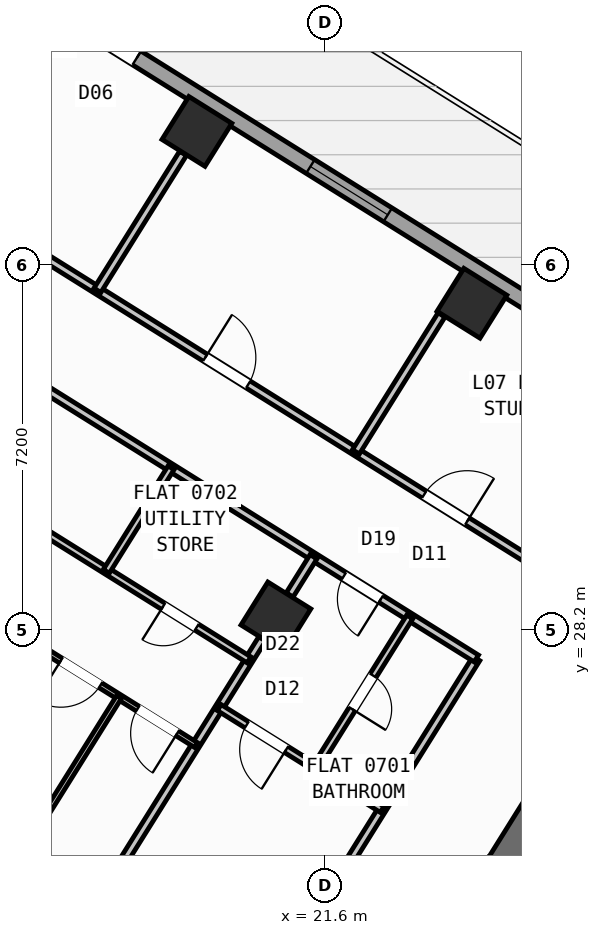
"""IFC4 building model, lengths in metres.
Left out: names, types, materials, properties, quantities, classifications, styles, units other than length and angle.
Written with IfcOpenShell. Run it as: python <this file> out.ifc"""

import sys

from ifc_helpers import new_model, si_unit, direction, frame, frame_2d, origin, origin_2d, place, context, subcontext, project, spatial, rectangle, hollow_rectangle, extrude, source, transform, mapped, element, fill, save


model = new_model("IFC4")
c1 = context("Model", 3, precision=1e-05, world=origin(), true_north=direction((0.0, 1.0)))
c2 = subcontext(c1, "Body", "Model", "MODEL_VIEW")
j1 = project(units=[si_unit("LENGTHUNIT", "METRE"), si_unit("PLANEANGLEUNIT", "RADIAN")], contexts=[c1])
p1 = place(None, origin())
s1 = spatial("IfcSite", under=j1, at=p1, CompositionType="ELEMENT")
p2 = place(p1, origin())
s2 = spatial("IfcBuilding", under=s1, at=p2, CompositionType="ELEMENT")
p3 = place(p2, frame((0.0, 0.0, 31.2)))
s3 = spatial("IfcBuildingStorey", under=s2, at=p3, CompositionType="ELEMENT", Elevation=31.2)
p4 = place(p3, frame((26.007, 24.976, 0.0), z_axis=(0.0, 0.0, 1.0), x_axis=(-0.529916319127, -0.848049936456, 0.0)))
e1 = element("IfcWall", 1, at=p4, inside=s3, PredefinedType="SHEAR", context=c2, shape_type="SweptSolid", body=[
    extrude(rectangle(XDim=6.375, YDim=0.65, at=frame_2d((3.188, 0.0))), origin(), (0.0, 0.0, 1.0), 3.35),
])
m1 = source(origin(), c2, "Body", "SweptSolid", [
    extrude(hollow_rectangle(XDim=1.0, YDim=1.0, WallThickness=0.04, at=origin_2d()), origin(), (0.0, 0.0, 1.0), 3.6),
])
for number, where, z_axis, x_axis in (
    (2, (24.5, 34.643, 0.0), (0.0, 0.0, 1.0), (-0.848, 0.53, 0.0)),
    (3, (20.632, 28.452, 0.0), (0.0, 0.0, 1.0), (-0.848, 0.53, 0.0)),
    (4, (19.073, 38.034, 0.0), (0.0, 0.0, 1.0), (-0.848, 0.53, 0.0)),
):
    element("IfcColumn", number, at=place(p3, frame(where, z_axis=z_axis, x_axis=x_axis)), inside=s3, PredefinedType="COLUMN", context=c2, shape_type="MappedRepresentation", body=[
        mapped(m1, transform((0.0, 0.0, 0.0), scale=1.0)),
    ])
p5 = place(p3, frame((14.138, 41.825, 0.0), z_axis=(0.0, 0.0, 1.0), x_axis=(0.848046498049, -0.529921821731, 0.0)))
e5 = element("IfcWall", 5, at=p5, inside=s3, PredefinedType="STANDARD", context=c2, shape_type="SweptSolid", body=[
    extrude(rectangle(XDim=31.588, YDim=0.32, at=frame_2d((15.794, 0.0))), origin(), (0.0, 0.0, 1.0), 3.35),
])
p6 = place(p5, frame((3.369, 0.0, 0.0)))
e6 = element("IfcOpeningElement", 6, at=p6, cuts=e5, PredefinedType="OPENING", context=c2, shape_type="SweptSolid", body=[
    extrude(rectangle(XDim=1.05, YDim=2.15, at=frame_2d((0.525, 1.075))), frame((0.0, 0.17, 0.0), z_axis=(0.0, -1.0, 0.0), x_axis=(1.0, 0.0, 0.0)), (0.0, 0.0, 1.0), 0.34),
])
p7 = place(p5, frame((0.946, 0.0, 0.85)))
e7 = element("IfcOpeningElement", 7, at=p7, cuts=e5, PredefinedType="OPENING", context=c2, shape_type="SweptSolid", body=[
    extrude(rectangle(XDim=1.8, YDim=1.5, at=frame_2d((0.9, 0.75))), frame((0.0, 0.17, 0.0), z_axis=(0.0, -1.0, 0.0), x_axis=(1.0, 0.0, 0.0)), (0.0, 0.0, 1.0), 0.34),
])
p8 = place(p5, frame((8.46, 0.0, 0.85)))
e8 = element("IfcOpeningElement", 8, at=p8, cuts=e5, PredefinedType="OPENING", context=c2, shape_type="SweptSolid", body=[
    extrude(rectangle(XDim=1.8, YDim=1.5, at=frame_2d((0.9, 0.75))), frame((0.0, 0.17, 0.0), z_axis=(0.0, -1.0, 0.0), x_axis=(1.0, 0.0, 0.0)), (0.0, 0.0, 1.0), 0.34),
])
p9 = place(p5, frame((13.899, 0.0, 0.85)))
e9 = element("IfcOpeningElement", 9, at=p9, cuts=e5, PredefinedType="OPENING", context=c2, shape_type="SweptSolid", body=[
    extrude(rectangle(XDim=1.5, YDim=1.5, at=frame_2d((0.75, 0.75))), frame((0.0, 0.17, 0.0), z_axis=(0.0, -1.0, 0.0), x_axis=(1.0, 0.0, 0.0)), (0.0, 0.0, 1.0), 0.34),
])
p10 = place(p5, frame((22.019, 0.0, 0.95)))
e10 = element("IfcOpeningElement", 10, at=p10, cuts=e5, PredefinedType="OPENING", context=c2, shape_type="SweptSolid", body=[
    extrude(rectangle(XDim=1.2, YDim=1.4, at=frame_2d((0.6, 0.7))), frame((0.0, 0.17, 0.0), z_axis=(0.0, -1.0, 0.0), x_axis=(1.0, 0.0, 0.0)), (0.0, 0.0, 1.0), 0.34),
])
p11 = place(p5, frame((27.569, 0.0, 0.95)))
e11 = element("IfcOpeningElement", 11, at=p11, cuts=e5, PredefinedType="OPENING", context=c2, shape_type="SweptSolid", body=[
    extrude(rectangle(XDim=1.2, YDim=1.4, at=frame_2d((0.6, 0.7))), frame((0.0, 0.17, 0.0), z_axis=(0.0, -1.0, 0.0), x_axis=(1.0, 0.0, 0.0)), (0.0, 0.0, 1.0), 0.34),
])
p12 = place(p3, frame((24.588, 27.631, 0.0), z_axis=(0.0, 0.0, 1.0), x_axis=(-0.529914586043, -0.848051019396, 0.0)))
e12 = element("IfcWall", 12, at=p12, inside=s3, PredefinedType="PARTITIONING", context=c2, shape_type="SweptSolid", body=[
    extrude(rectangle(XDim=15.35, YDim=0.16, at=frame_2d((7.675, 0.0))), origin(), (0.0, 0.0, 1.0), 3.34),
])
p13 = place(p3, frame((25.754, 29.497, 0.0), z_axis=(0.0, 0.0, 1.0), x_axis=(-0.848045850158, 0.529922858565, 0.0)))
e13 = element("IfcWall", 13, at=p13, inside=s3, PredefinedType="PARTITIONING", context=c2, shape_type="SweptSolid", body=[
    extrude(rectangle(XDim=16.73, YDim=0.16, at=frame_2d((8.365, 0.0))), origin(), (0.0, 0.0, 1.0), 3.34),
])
p14 = place(p13, frame((1.588, 0.0, 0.0)))
e14 = element("IfcOpeningElement", 14, at=p14, cuts=e13, PredefinedType="OPENING", context=c2, shape_type="SweptSolid", body=[
    extrude(rectangle(XDim=1.0, YDim=2.1, at=frame_2d((0.5, 1.05))), frame((0.0, 0.09, 0.0), z_axis=(0.0, -1.0, 0.0), x_axis=(1.0, 0.0, 0.0)), (0.0, 0.0, 1.0), 0.18),
])
p15 = place(p13, frame((6.685, 0.0, 0.0)))
e15 = element("IfcOpeningElement", 15, at=p15, cuts=e13, PredefinedType="OPENING", context=c2, shape_type="SweptSolid", body=[
    extrude(rectangle(XDim=1.0, YDim=2.1, at=frame_2d((0.5, 1.05))), frame((0.0, 0.09, 0.0), z_axis=(0.0, -1.0, 0.0), x_axis=(1.0, 0.0, 0.0)), (0.0, 0.0, 1.0), 0.18),
])
p16 = place(p13, frame((12.951, 0.0, 0.0)))
e16 = element("IfcOpeningElement", 16, at=p16, cuts=e13, PredefinedType="OPENING", context=c2, shape_type="SweptSolid", body=[
    extrude(rectangle(XDim=1.0, YDim=2.1, at=frame_2d((0.5, 1.05))), frame((0.0, 0.09, 0.0), z_axis=(0.0, -1.0, 0.0), x_axis=(1.0, 0.0, 0.0)), (0.0, 0.0, 1.0), 0.18),
])
p17 = place(p3, frame((24.588, 27.631, 0.0), z_axis=(0.0, 0.0, 1.0), x_axis=(-0.848041752158, 0.529929416617, 0.0)))
e17 = element("IfcWall", 17, at=p17, inside=s3, PredefinedType="PARTITIONING", context=c2, shape_type="SweptSolid", body=[
    extrude(rectangle(XDim=16.73, YDim=0.16, at=frame_2d((8.365, 0.0))), origin(), (0.0, 0.0, 1.0), 3.34),
])
p18 = place(p17, frame((2.22, 0.0, 0.0)))
e18 = element("IfcOpeningElement", 18, at=p18, cuts=e17, PredefinedType="OPENING", context=c2, shape_type="SweptSolid", body=[
    extrude(rectangle(XDim=0.86, YDim=2.05, at=frame_2d((0.43, 1.025))), frame((0.0, 0.09, 0.0), z_axis=(0.0, -1.0, 0.0), x_axis=(1.0, 0.0, 0.0)), (0.0, 0.0, 1.0), 0.18),
])
p19 = place(p17, frame((14.22, 0.0, 0.0)))
e19 = element("IfcOpeningElement", 19, at=p19, cuts=e17, PredefinedType="OPENING", context=c2, shape_type="SweptSolid", body=[
    extrude(rectangle(XDim=1.0, YDim=2.1, at=frame_2d((0.5, 1.05))), frame((0.0, 0.09, 0.0), z_axis=(0.0, -1.0, 0.0), x_axis=(1.0, 0.0, 0.0)), (0.0, 0.0, 1.0), 0.18),
])
p20 = place(p3, frame((21.374, 29.639, 0.0), z_axis=(0.0, 0.0, 1.0), x_axis=(-0.529974231203, -0.848013746505, 0.0)))
e20 = element("IfcWall", 20, at=p20, inside=s3, PredefinedType="PARTITIONING", context=c2, shape_type="SweptSolid", body=[
    extrude(rectangle(XDim=0.888, YDim=0.16, at=frame_2d((0.444, 0.0))), origin(), (0.0, 0.0, 1.0), 2.725),
])
p21 = place(p3, frame((20.361, 28.018, 0.0), z_axis=(0.0, 0.0, 1.0), x_axis=(-0.529915015264, -0.848050751193, 0.0)))
e21 = element("IfcWall", 21, at=p21, inside=s3, PredefinedType="PARTITIONING", context=c2, shape_type="SweptSolid", body=[
    extrude(rectangle(XDim=6.276, YDim=0.16, at=frame_2d((3.138, 0.0))), origin(), (0.0, 0.0, 1.0), 2.725),
])
p22 = place(p3, frame((22.728, 24.654, 0.0), z_axis=(0.0, 0.0, 1.0), x_axis=(-0.848059820872, 0.529900500304, 0.0)))
e22 = element("IfcWall", 22, at=p22, inside=s3, PredefinedType="PLUMBINGWALL", context=c2, shape_type="SweptSolid", body=[
    extrude(rectangle(XDim=3.79, YDim=0.14, at=frame_2d((1.895, 0.0))), origin(), (0.0, 0.0, 1.0), 3.34),
])
p23 = place(p22, frame((2.23, 0.0, 0.0)))
e23 = element("IfcOpeningElement", 23, at=p23, cuts=e22, PredefinedType="OPENING", context=c2, shape_type="SweptSolid", body=[
    extrude(rectangle(XDim=0.92, YDim=2.08, at=frame_2d((0.46, 1.04))), frame((0.0, 0.08, 0.0), z_axis=(0.0, -1.0, 0.0), x_axis=(1.0, 0.0, 0.0)), (0.0, 0.0, 1.0), 0.16),
])
p24 = place(p3, frame((23.273, 28.452, 0.0), z_axis=(0.0, 0.0, 1.0), x_axis=(-0.529867639402, -0.848080352747, 0.0)))
e24 = element("IfcWall", 24, at=p24, inside=s3, PredefinedType="PLUMBINGWALL", context=c2, shape_type="SweptSolid", body=[
    extrude(rectangle(XDim=3.51, YDim=0.14, at=frame_2d((1.755, 0.0))), origin(), (0.0, 0.0, 1.0), 2.995),
])
p25 = place(p24, frame((1.365, 0.0, 0.0)))
e25 = element("IfcOpeningElement", 25, at=p25, cuts=e24, PredefinedType="OPENING", context=c2, shape_type="SweptSolid", body=[
    extrude(rectangle(XDim=0.78, YDim=2.05, at=frame_2d((0.39, 1.025))), frame((0.0, 0.08, 0.0), z_axis=(0.0, -1.0, 0.0), x_axis=(1.0, 0.0, 0.0)), (0.0, 0.0, 1.0), 0.16),
])
p26 = place(p3, frame((20.102, 27.604, 0.0), z_axis=(0.0, 0.0, 1.0), x_axis=(-0.848044326704, 0.52992529657, 0.0)))
e26 = element("IfcWall", 26, at=p26, inside=s3, PredefinedType="PLUMBINGWALL", context=c2, shape_type="SweptSolid", body=[
    extrude(rectangle(XDim=8.94, YDim=0.14, at=frame_2d((4.47, 0.0))), origin(), (0.0, 0.0, 1.0), 3.34),
])
p27 = place(p26, frame((5.087, 0.0, 0.0)))
e27 = element("IfcOpeningElement", 27, at=p27, cuts=e26, PredefinedType="OPENING", context=c2, shape_type="SweptSolid", body=[
    extrude(rectangle(XDim=0.78, YDim=2.05, at=frame_2d((0.39, 1.025))), frame((0.0, 0.08, 0.0), z_axis=(0.0, -1.0, 0.0), x_axis=(1.0, 0.0, 0.0)), (0.0, 0.0, 1.0), 0.16),
])
p28 = place(p26, frame((1.218, 0.0, 0.0)))
e28 = element("IfcOpeningElement", 28, at=p28, cuts=e26, PredefinedType="OPENING", context=c2, shape_type="SweptSolid", body=[
    extrude(rectangle(XDim=0.78, YDim=2.05, at=frame_2d((0.39, 1.025))), frame((0.0, 0.08, 0.0), z_axis=(0.0, -1.0, 0.0), x_axis=(1.0, 0.0, 0.0)), (0.0, 0.0, 1.0), 0.16),
])
p29 = place(p3, frame((18.563, 31.396, 0.0), z_axis=(0.0, 0.0, 1.0), x_axis=(-0.530008045701, -0.847992612876, 0.0)))
e29 = element("IfcWall", 29, at=p29, inside=s3, PredefinedType="PLUMBINGWALL", context=c2, shape_type="SweptSolid", body=[
    extrude(rectangle(XDim=2.41, YDim=0.14, at=frame_2d((1.205, 0.0))), origin(), (0.0, 0.0, 1.0), 3.34),
])
p30 = place(p3, frame((19.053, 25.925, 0.0), z_axis=(0.0, 0.0, 1.0), x_axis=(-0.848051995289, 0.529913024266, 0.0)))
e30 = element("IfcWall", 30, at=p30, inside=s3, PredefinedType="PARTITIONING", context=c2, shape_type="SweptSolid", body=[
    extrude(rectangle(XDim=8.94, YDim=0.11, at=frame_2d((4.47, 0.0))), origin(), (0.0, 0.0, 1.0), 3.34),
])
p31 = place(p30, frame((0.434, 0.0, 0.0)))
e31 = element("IfcOpeningElement", 31, at=p31, cuts=e30, PredefinedType="OPENING", context=c2, shape_type="SweptSolid", body=[
    extrude(rectangle(XDim=0.92, YDim=2.08, at=frame_2d((0.46, 1.04))), frame((0.0, 0.065, 0.0), z_axis=(0.0, -1.0, 0.0), x_axis=(1.0, 0.0, 0.0)), (0.0, 0.0, 1.0), 0.13),
])
p32 = place(p30, frame((2.222, 0.0, 0.0)))
e32 = element("IfcOpeningElement", 32, at=p32, cuts=e30, PredefinedType="OPENING", context=c2, shape_type="SweptSolid", body=[
    extrude(rectangle(XDim=0.92, YDim=2.08, at=frame_2d((0.46, 1.04))), frame((0.0, 0.065, 0.0), z_axis=(0.0, -1.0, 0.0), x_axis=(1.0, 0.0, 0.0)), (0.0, 0.0, 1.0), 0.13),
])
p33 = place(p30, frame((4.01, 0.0, 0.0)))
e33 = element("IfcOpeningElement", 33, at=p33, cuts=e30, PredefinedType="OPENING", context=c2, shape_type="SweptSolid", body=[
    extrude(rectangle(XDim=0.92, YDim=2.08, at=frame_2d((0.46, 1.04))), frame((0.0, 0.065, 0.0), z_axis=(0.0, -1.0, 0.0), x_axis=(1.0, 0.0, 0.0)), (0.0, 0.0, 1.0), 0.13),
])
p34 = place(p30, frame((5.798, 0.0, 0.0)))
e34 = element("IfcOpeningElement", 34, at=p34, cuts=e30, PredefinedType="OPENING", context=c2, shape_type="SweptSolid", body=[
    extrude(rectangle(XDim=0.92, YDim=2.08, at=frame_2d((0.46, 1.04))), frame((0.0, 0.065, 0.0), z_axis=(0.0, -1.0, 0.0), x_axis=(1.0, 0.0, 0.0)), (0.0, 0.0, 1.0), 0.13),
])
p35 = place(p30, frame((7.586, 0.0, 0.0)))
e35 = element("IfcOpeningElement", 35, at=p35, cuts=e30, PredefinedType="OPENING", context=c2, shape_type="SweptSolid", body=[
    extrude(rectangle(XDim=0.92, YDim=2.08, at=frame_2d((0.46, 1.04))), frame((0.0, 0.065, 0.0), z_axis=(0.0, -1.0, 0.0), x_axis=(1.0, 0.0, 0.0)), (0.0, 0.0, 1.0), 0.13),
])
p36 = place(p3, frame((17.537, 26.872, 0.0), z_axis=(0.0, 0.0, 1.0), x_axis=(-0.529922792977, -0.848045891142, 0.0)))
e36 = element("IfcWall", 36, at=p36, inside=s3, PredefinedType="PARTITIONING", context=c2, shape_type="SweptSolid", body=[
    extrude(rectangle(XDim=11.24, YDim=0.11, at=frame_2d((5.62, 0.0))), origin(), (0.0, 0.0, 1.0), 3.34),
])
p37 = place(p3, frame((23.901, 34.414, 0.0), z_axis=(0.0, 0.0, 1.0), x_axis=(-0.529930102756, -0.848041323399, 0.0)))
e37 = element("IfcWall", 37, at=p37, inside=s3, PredefinedType="PARTITIONING", context=c2, shape_type="SweptSolid", body=[
    extrude(rectangle(XDim=3.188, YDim=0.16, at=frame_2d((1.594, 0.0))), origin(), (0.0, 0.0, 1.0), 3.34),
])
p38 = place(p3, frame((18.799, 37.602, 0.0), z_axis=(0.0, 0.0, 1.0), x_axis=(-0.529930102756, -0.848041323399, 0.0)))
e38 = element("IfcWall", 38, at=p38, inside=s3, PredefinedType="PARTITIONING", context=c2, shape_type="SweptSolid", body=[
    extrude(rectangle(XDim=3.188, YDim=0.16, at=frame_2d((1.594, 0.0))), origin(), (0.0, 0.0, 1.0), 2.725),
])
m2 = source(origin(), c2, "Body", "SweptSolid", [
    extrude(rectangle(XDim=1.05, YDim=2.15, at=frame_2d((0.525, 1.075))), frame((0.0, 0.025, 0.0), z_axis=(0.0, -1.0, 0.0), x_axis=(1.0, 0.0, 0.0)), (0.0, 0.0, 1.0), 0.05),
])
p39 = place(p6, origin())
e39 = element("IfcDoor", 39, at=p39, inside=s3, OperationType="SINGLE_SWING_RIGHT", PredefinedType="DOOR", context=c2, shape_type="MappedRepresentation", body=[
    mapped(m2, transform((0.0, 0.0, 0.0), scale=1.0)),
])
fill(e6, e39)
m3 = source(origin(), c2, "Body", "SweptSolid", [
    extrude(rectangle(XDim=1.8, YDim=1.5, at=frame_2d((0.9, 0.75))), frame((0.0, 0.03, 0.0), z_axis=(0.0, -1.0, 0.0), x_axis=(1.0, 0.0, 0.0)), (0.0, 0.0, 1.0), 0.06),
])
p40 = place(p8, origin())
e40 = element("IfcWindow", 40, at=p40, inside=s3, PartitioningType="SINGLE_PANEL", PredefinedType="WINDOW", context=c2, shape_type="MappedRepresentation", body=[
    mapped(m3, transform((0.0, 0.0, 0.0), scale=1.0)),
])
fill(e8, e40)
m4 = source(origin(), c2, "Body", "SweptSolid", [
    extrude(rectangle(XDim=0.86, YDim=2.05, at=frame_2d((0.43, 1.025))), frame((0.0, 0.025, 0.0), z_axis=(0.0, -1.0, 0.0), x_axis=(1.0, 0.0, 0.0)), (0.0, 0.0, 1.0), 0.05),
])
p41 = place(p18, origin())
e41 = element("IfcDoor", 41, at=p41, inside=s3, OperationType="SINGLE_SWING_LEFT", PredefinedType="DOOR", context=c2, shape_type="MappedRepresentation", body=[
    mapped(m4, transform((0.0, 0.0, 0.0), scale=1.0)),
])
fill(e18, e41)
m5 = source(origin(), c2, "Body", "SweptSolid", [
    extrude(rectangle(XDim=0.92, YDim=2.08, at=frame_2d((0.46, 1.04))), frame((0.0, 0.025, 0.0), z_axis=(0.0, -1.0, 0.0), x_axis=(1.0, 0.0, 0.0)), (0.0, 0.0, 1.0), 0.05),
])
p42 = place(p23, origin())
e42 = element("IfcDoor", 42, at=p42, inside=s3, OperationType="SINGLE_SWING_LEFT", PredefinedType="DOOR", context=c2, shape_type="MappedRepresentation", body=[
    mapped(m5, transform((0.0, 0.0, 0.0), scale=1.0)),
])
fill(e23, e42)
m6 = source(origin(), c2, "Body", "SweptSolid", [
    extrude(rectangle(XDim=0.78, YDim=2.05, at=frame_2d((0.39, 1.025))), frame((0.0, 0.025, 0.0), z_axis=(0.0, -1.0, 0.0), x_axis=(1.0, 0.0, 0.0)), (0.0, 0.0, 1.0), 0.05),
])
p43 = place(p25, origin())
e43 = element("IfcDoor", 43, at=p43, inside=s3, OperationType="SINGLE_SWING_RIGHT", PredefinedType="DOOR", context=c2, shape_type="MappedRepresentation", body=[
    mapped(m6, transform((0.0, 0.0, 0.0), scale=1.0)),
])
fill(e25, e43)
p44 = place(p28, origin())
e44 = element("IfcDoor", 44, at=p44, inside=s3, OperationType="SINGLE_SWING_RIGHT", PredefinedType="DOOR", context=c2, shape_type="MappedRepresentation", body=[
    mapped(m6, transform((0.0, 0.0, 0.0), scale=1.0)),
])
fill(e28, e44)
p45 = place(p31, origin())
e45 = element("IfcDoor", 45, at=p45, inside=s3, OperationType="SINGLE_SWING_LEFT", PredefinedType="DOOR", context=c2, shape_type="MappedRepresentation", body=[
    mapped(m5, transform((0.0, 0.0, 0.0), scale=1.0)),
])
fill(e31, e45)
p46 = place(p32, origin())
e46 = element("IfcDoor", 46, at=p46, inside=s3, OperationType="SINGLE_SWING_RIGHT", PredefinedType="DOOR", context=c2, shape_type="MappedRepresentation", body=[
    mapped(m5, transform((0.0, 0.0, 0.0), scale=1.0)),
])
fill(e32, e46)
m7 = source(origin(), c2, "Body", "SweptSolid", [
    extrude(rectangle(XDim=1.0, YDim=2.1, at=frame_2d((0.5, 1.05))), frame((0.0, 0.025, 0.0), z_axis=(0.0, -1.0, 0.0), x_axis=(1.0, 0.0, 0.0)), (0.0, 0.0, 1.0), 0.05),
])
p47 = place(p14, frame((1.0, 0.0, 0.0), z_axis=(0.0, 0.0, 1.0), x_axis=(-1.0, 0.0, 0.0)))
e47 = element("IfcDoor", 47, at=p47, inside=s3, OperationType="SINGLE_SWING_RIGHT", PredefinedType="DOOR", context=c2, shape_type="MappedRepresentation", body=[
    mapped(m7, transform((0.0, 0.0, 0.0), scale=1.0)),
])
fill(e14, e47)
p48 = place(p15, frame((1.0, 0.0, 0.0), z_axis=(0.0, 0.0, 1.0), x_axis=(-1.0, 0.0, 0.0)))
e48 = element("IfcDoor", 48, at=p48, inside=s3, OperationType="SINGLE_SWING_LEFT", PredefinedType="DOOR", context=c2, shape_type="MappedRepresentation", body=[
    mapped(m7, transform((0.0, 0.0, 0.0), scale=1.0)),
])
fill(e15, e48)
save(model, sys.argv[1])
